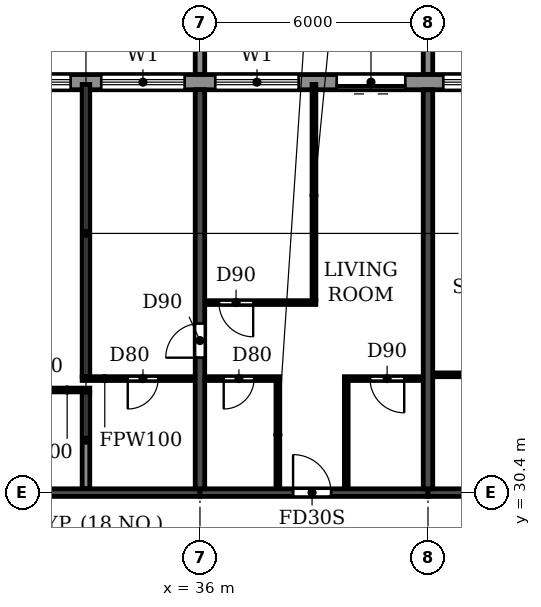
"""IFC4 building model, lengths in metres.
Left out: names, types, materials, properties, quantities, classifications, styles, units other than length and angle.
Written with IfcOpenShell. Run it as: python <this file> out.ifc"""

import sys

from ifc_helpers import new_model, si_unit, direction, frame, frame_2d, origin, place, context, subcontext, project, spatial, polyline, rectangle, outline, extrude, source, transform, mapped, element, fill, save


model = new_model("IFC4")
c1 = context("Model", 3, precision=1e-05, world=origin(), true_north=direction((0.0, 1.0)))
c2 = subcontext(c1, "Body", "Model", "MODEL_VIEW")
j1 = project(units=[si_unit("LENGTHUNIT", "METRE"), si_unit("PLANEANGLEUNIT", "RADIAN")], contexts=[c1])
p1 = place(None, origin())
s1 = spatial("IfcSite", under=j1, at=p1, CompositionType="ELEMENT")
p2 = place(p1, origin())
s2 = spatial("IfcBuilding", under=s1, at=p2, CompositionType="ELEMENT")
p3 = place(p2, frame((0.0, 0.0, 231.3)))
s3 = spatial("IfcBuildingStorey", under=s2, at=p3, CompositionType="ELEMENT", Elevation=231.3)
p4 = place(p3, frame((36.0, 30.5, 0.0), z_axis=(0.0, 0.0, 1.0), x_axis=(0.0, 1.0, 0.0)))
e1 = element("IfcWall", 1, at=p4, inside=s3, PredefinedType="SHEAR", context=c2, shape_type="SweptSolid", body=[
    extrude(rectangle(XDim=10.5, YDim=0.25, at=frame_2d((5.25, 0.0))), origin(), (0.0, 0.0, 1.0), 3.08),
])
p5 = place(p4, frame((3.45, 0.0, 0.0)))
e2 = element("IfcOpeningElement", 2, at=p5, cuts=e1, PredefinedType="OPENING", context=c2, shape_type="SweptSolid", body=[
    extrude(rectangle(XDim=0.9, YDim=2.1, at=frame_2d((0.45, 1.05))), frame((0.0, 0.135, 0.0), z_axis=(0.0, -1.0, 0.0), x_axis=(1.0, 0.0, 0.0)), (0.0, 0.0, 1.0), 0.27),
])
p6 = place(p3, frame((42.0, 30.5, 0.0), z_axis=(0.0, 0.0, 1.0), x_axis=(0.0, 1.0, 0.0)))
e3 = element("IfcWall", 3, at=p6, inside=s3, PredefinedType="SHEAR", context=c2, shape_type="SweptSolid", body=[
    extrude(rectangle(XDim=10.5, YDim=0.25, at=frame_2d((5.25, 0.0))), origin(), (0.0, 0.0, 1.0), 3.08),
])
p7 = place(p3, frame((30.0, 30.4, 0.0), z_axis=(0.0, 0.0, 1.0), x_axis=(1.0, 0.0, 0.0)))
e4 = element("IfcWall", 4, at=p7, inside=s3, PredefinedType="SHEAR", context=c2, shape_type="SweptSolid", body=[
    extrude(rectangle(XDim=6.0, YDim=0.2, at=frame_2d((3.0, 0.0))), origin(), (0.0, 0.0, 1.0), 2.48),
])
p8 = place(p3, frame((36.0, 30.4, 0.0), z_axis=(0.0, 0.0, 1.0), x_axis=(1.0, 0.0, 0.0)))
e5 = element("IfcWall", 5, at=p8, inside=s3, PredefinedType="SHEAR", context=c2, shape_type="SweptSolid", body=[
    extrude(rectangle(XDim=6.0, YDim=0.2, at=frame_2d((3.0, 0.0))), origin(), (0.0, 0.0, 1.0), 2.48),
])
p9 = place(p8, frame((2.45, 0.0, 0.0)))
e6 = element("IfcOpeningElement", 6, at=p9, cuts=e5, PredefinedType="OPENING", context=c2, shape_type="SweptSolid", body=[
    extrude(rectangle(XDim=1.0, YDim=2.1, at=frame_2d((0.5, 1.05))), frame((0.0, 0.11, 0.0), z_axis=(0.0, -1.0, 0.0), x_axis=(1.0, 0.0, 0.0)), (0.0, 0.0, 1.0), 0.22),
])
p10 = place(p3, frame((42.0, 30.4, 0.0), z_axis=(0.0, 0.0, 1.0), x_axis=(1.0, 0.0, 0.0)))
e7 = element("IfcWall", 7, at=p10, inside=s3, PredefinedType="SHEAR", context=c2, shape_type="SweptSolid", body=[
    extrude(rectangle(XDim=6.0, YDim=0.2, at=frame_2d((3.0, 0.0))), origin(), (0.0, 0.0, 1.0), 2.48),
])
p11 = place(p10, frame((2.55, 0.0, 0.0)))
e8 = element("IfcOpeningElement", 8, at=p11, cuts=e7, PredefinedType="OPENING", context=c2, shape_type="SweptSolid", body=[
    extrude(rectangle(XDim=1.0, YDim=2.1, at=frame_2d((0.5, 1.05))), frame((0.0, 0.11, 0.0), z_axis=(0.0, -1.0, 0.0), x_axis=(1.0, 0.0, 0.0)), (0.0, 0.0, 1.0), 0.22),
])
p12 = place(p3, frame((79.317, 41.2, 0.0), z_axis=(0.0, 0.0, 1.0), x_axis=(-1.0, 0.0, 0.0)))
e9 = element("IfcWall", 9, at=p12, inside=s3, PredefinedType="STANDARD", context=c2, shape_type="SweptSolid", body=[
    extrude(rectangle(XDim=56.634, YDim=0.4, at=frame_2d((28.317, 0.0))), origin(), (0.0, 0.0, 1.0), 3.08),
])
p13 = place(p12, frame((52.917, 0.0, 0.0)))
e10 = element("IfcOpeningElement", 10, at=p13, cuts=e9, PredefinedType="OPENING", context=c2, shape_type="SweptSolid", body=[
    extrude(rectangle(XDim=1.8, YDim=2.4, at=frame_2d((0.9, 1.2))), frame((0.0, 0.21, 0.0), z_axis=(0.0, -1.0, 0.0), x_axis=(1.0, 0.0, 0.0)), (0.0, 0.0, 1.0), 0.42),
])
p14 = place(p12, frame((49.717, 0.0, 0.9)))
e11 = element("IfcOpeningElement", 11, at=p14, cuts=e9, PredefinedType="OPENING", context=c2, shape_type="SweptSolid", body=[
    extrude(rectangle(XDim=2.2, YDim=1.5, at=frame_2d((1.1, 0.75))), frame((0.0, 0.21, 0.0), z_axis=(0.0, -1.0, 0.0), x_axis=(1.0, 0.0, 0.0)), (0.0, 0.0, 1.0), 0.42),
])
p15 = place(p12, frame((46.717, 0.0, 0.9)))
e12 = element("IfcOpeningElement", 12, at=p15, cuts=e9, PredefinedType="OPENING", context=c2, shape_type="SweptSolid", body=[
    extrude(rectangle(XDim=2.2, YDim=1.5, at=frame_2d((1.1, 0.75))), frame((0.0, 0.21, 0.0), z_axis=(0.0, -1.0, 0.0), x_axis=(1.0, 0.0, 0.0)), (0.0, 0.0, 1.0), 0.42),
])
p16 = place(p12, frame((43.717, 0.0, 0.9)))
e13 = element("IfcOpeningElement", 13, at=p16, cuts=e9, PredefinedType="OPENING", context=c2, shape_type="SweptSolid", body=[
    extrude(rectangle(XDim=2.2, YDim=1.5, at=frame_2d((1.1, 0.75))), frame((0.0, 0.21, 0.0), z_axis=(0.0, -1.0, 0.0), x_axis=(1.0, 0.0, 0.0)), (0.0, 0.0, 1.0), 0.42),
])
p17 = place(p12, frame((40.717, 0.0, 0.9)))
e14 = element("IfcOpeningElement", 14, at=p17, cuts=e9, PredefinedType="OPENING", context=c2, shape_type="SweptSolid", body=[
    extrude(rectangle(XDim=2.2, YDim=1.5, at=frame_2d((1.1, 0.75))), frame((0.0, 0.21, 0.0), z_axis=(0.0, -1.0, 0.0), x_axis=(1.0, 0.0, 0.0)), (0.0, 0.0, 1.0), 0.42),
])
p18 = place(p12, frame((37.917, 0.0, 0.0)))
e15 = element("IfcOpeningElement", 15, at=p18, cuts=e9, PredefinedType="OPENING", context=c2, shape_type="SweptSolid", body=[
    extrude(rectangle(XDim=1.8, YDim=2.4, at=frame_2d((0.9, 1.2))), frame((0.0, 0.21, 0.0), z_axis=(0.0, -1.0, 0.0), x_axis=(1.0, 0.0, 0.0)), (0.0, 0.0, 1.0), 0.42),
])
p19 = place(p12, frame((34.717, 0.0, 0.9)))
e16 = element("IfcOpeningElement", 16, at=p19, cuts=e9, PredefinedType="OPENING", context=c2, shape_type="SweptSolid", body=[
    extrude(rectangle(XDim=2.2, YDim=1.5, at=frame_2d((1.1, 0.75))), frame((0.0, 0.21, 0.0), z_axis=(0.0, -1.0, 0.0), x_axis=(1.0, 0.0, 0.0)), (0.0, 0.0, 1.0), 0.42),
])
p20 = place(p12, frame((31.917, 0.0, 0.0)))
e17 = element("IfcOpeningElement", 17, at=p20, cuts=e9, PredefinedType="OPENING", context=c2, shape_type="SweptSolid", body=[
    extrude(rectangle(XDim=1.8, YDim=2.4, at=frame_2d((0.9, 1.2))), frame((0.0, 0.21, 0.0), z_axis=(0.0, -1.0, 0.0), x_axis=(1.0, 0.0, 0.0)), (0.0, 0.0, 1.0), 0.42),
])
p21 = place(p12, frame((28.717, 0.0, 0.9)))
e18 = element("IfcOpeningElement", 18, at=p21, cuts=e9, PredefinedType="OPENING", context=c2, shape_type="SweptSolid", body=[
    extrude(rectangle(XDim=2.2, YDim=1.5, at=frame_2d((1.1, 0.75))), frame((0.0, 0.21, 0.0), z_axis=(0.0, -1.0, 0.0), x_axis=(1.0, 0.0, 0.0)), (0.0, 0.0, 1.0), 0.42),
])
p22 = place(p12, frame((25.917, 0.0, 0.0)))
e19 = element("IfcOpeningElement", 19, at=p22, cuts=e9, PredefinedType="OPENING", context=c2, shape_type="SweptSolid", body=[
    extrude(rectangle(XDim=1.8, YDim=2.4, at=frame_2d((0.9, 1.2))), frame((0.0, 0.21, 0.0), z_axis=(0.0, -1.0, 0.0), x_axis=(1.0, 0.0, 0.0)), (0.0, 0.0, 1.0), 0.42),
])
p23 = place(p12, frame((22.717, 0.0, 0.9)))
e20 = element("IfcOpeningElement", 20, at=p23, cuts=e9, PredefinedType="OPENING", context=c2, shape_type="SweptSolid", body=[
    extrude(rectangle(XDim=2.2, YDim=1.5, at=frame_2d((1.1, 0.75))), frame((0.0, 0.21, 0.0), z_axis=(0.0, -1.0, 0.0), x_axis=(1.0, 0.0, 0.0)), (0.0, 0.0, 1.0), 0.42),
])
p24 = place(p12, frame((19.717, 0.0, 0.9)))
e21 = element("IfcOpeningElement", 21, at=p24, cuts=e9, PredefinedType="OPENING", context=c2, shape_type="SweptSolid", body=[
    extrude(rectangle(XDim=2.2, YDim=1.5, at=frame_2d((1.1, 0.75))), frame((0.0, 0.21, 0.0), z_axis=(0.0, -1.0, 0.0), x_axis=(1.0, 0.0, 0.0)), (0.0, 0.0, 1.0), 0.42),
])
p25 = place(p12, frame((16.717, 0.0, 0.9)))
e22 = element("IfcOpeningElement", 22, at=p25, cuts=e9, PredefinedType="OPENING", context=c2, shape_type="SweptSolid", body=[
    extrude(rectangle(XDim=2.2, YDim=1.5, at=frame_2d((1.1, 0.75))), frame((0.0, 0.21, 0.0), z_axis=(0.0, -1.0, 0.0), x_axis=(1.0, 0.0, 0.0)), (0.0, 0.0, 1.0), 0.42),
])
p26 = place(p12, frame((13.917, 0.0, 0.0)))
e23 = element("IfcOpeningElement", 23, at=p26, cuts=e9, PredefinedType="OPENING", context=c2, shape_type="SweptSolid", body=[
    extrude(rectangle(XDim=1.8, YDim=2.4, at=frame_2d((0.9, 1.2))), frame((0.0, 0.21, 0.0), z_axis=(0.0, -1.0, 0.0), x_axis=(1.0, 0.0, 0.0)), (0.0, 0.0, 1.0), 0.42),
])
p27 = place(p12, frame((10.717, 0.0, 0.9)))
e24 = element("IfcOpeningElement", 24, at=p27, cuts=e9, PredefinedType="OPENING", context=c2, shape_type="SweptSolid", body=[
    extrude(rectangle(XDim=2.2, YDim=1.5, at=frame_2d((1.1, 0.75))), frame((0.0, 0.21, 0.0), z_axis=(0.0, -1.0, 0.0), x_axis=(1.0, 0.0, 0.0)), (0.0, 0.0, 1.0), 0.42),
])
p28 = place(p12, frame((7.917, 0.0, 0.0)))
e25 = element("IfcOpeningElement", 25, at=p28, cuts=e9, PredefinedType="OPENING", context=c2, shape_type="SweptSolid", body=[
    extrude(rectangle(XDim=1.8, YDim=2.4, at=frame_2d((0.9, 1.2))), frame((0.0, 0.21, 0.0), z_axis=(0.0, -1.0, 0.0), x_axis=(1.0, 0.0, 0.0)), (0.0, 0.0, 1.0), 0.42),
])
p29 = place(p12, frame((4.717, 0.0, 0.9)))
e26 = element("IfcOpeningElement", 26, at=p29, cuts=e9, PredefinedType="OPENING", context=c2, shape_type="SweptSolid", body=[
    extrude(rectangle(XDim=2.2, YDim=1.5, at=frame_2d((1.1, 0.75))), frame((0.0, 0.21, 0.0), z_axis=(0.0, -1.0, 0.0), x_axis=(1.0, 0.0, 0.0)), (0.0, 0.0, 1.0), 0.42),
])
p30 = place(p12, frame((1.917, 0.0, 0.0)))
e27 = element("IfcOpeningElement", 27, at=p30, cuts=e9, PredefinedType="OPENING", context=c2, shape_type="SweptSolid", body=[
    extrude(rectangle(XDim=1.8, YDim=2.4, at=frame_2d((0.9, 1.2))), frame((0.0, 0.21, 0.0), z_axis=(0.0, -1.0, 0.0), x_axis=(1.0, 0.0, 0.0)), (0.0, 0.0, 1.0), 0.42),
])
m1 = source(origin(), c2, "Body", "SweptSolid", [
    extrude(outline(polyline([(0.0, 0.0), (0.25, 0.0), (0.25, 3.1), (0.0, 3.1), (0.0, 0.0)])), origin(), (0.0, 0.0, 1.0), 3.1),
])
for number, where in (
    (28, (35.875, 41.4, 0.0)),
    (29, (41.875, 41.4, 0.0)),
):
    element("IfcWall", number, at=place(p3, frame(where)), inside=s3, PredefinedType="STANDARD", context=c2, shape_type="MappedRepresentation", body=[
        mapped(m1, transform((0.0, 0.0, 0.0))),
    ])
p31 = place(p3, frame((33.0, 30.51, 0.0), z_axis=(0.0, 0.0, 1.0), x_axis=(0.0, 1.0, 0.0)))
e30 = element("IfcWall", 30, at=p31, inside=s3, PredefinedType="PARTITIONING", context=c2, shape_type="SweptSolid", body=[
    extrude(rectangle(XDim=2.54, YDim=0.2, at=frame_2d((1.27, 0.0))), origin(), (0.0, 0.0, 1.0), 3.08),
])
p32 = place(p3, frame((33.0, 33.45, 0.0), z_axis=(0.0, 0.0, 1.0), x_axis=(0.0, 1.0, 0.0)))
e31 = element("IfcWall", 31, at=p32, inside=s3, PredefinedType="PARTITIONING", context=c2, shape_type="SweptSolid", body=[
    extrude(rectangle(XDim=7.69, YDim=0.2, at=frame_2d((3.845, 0.0))), origin(), (0.0, 0.0, 1.0), 3.08),
])
p33 = place(p3, frame((30.135, 33.1, 0.0), z_axis=(0.0, 0.0, 1.0), x_axis=(1.0, 0.0, 0.0)))
e32 = element("IfcWall", 32, at=p33, inside=s3, PredefinedType="PARTITIONING", context=c2, shape_type="SweptSolid", body=[
    extrude(rectangle(XDim=2.965, YDim=0.1, at=frame_2d((1.482, 0.0))), origin(), (0.0, 0.0, 1.0), 3.08),
])
p34 = place(p33, frame((0.965, 0.0, 0.0)))
e33 = element("IfcOpeningElement", 33, at=p34, cuts=e32, PredefinedType="OPENING", context=c2, shape_type="SweptSolid", body=[
    extrude(rectangle(XDim=0.8, YDim=2.1, at=frame_2d((0.4, 1.05))), frame((0.0, 0.06, 0.0), z_axis=(0.0, -1.0, 0.0), x_axis=(1.0, 0.0, 0.0)), (0.0, 0.0, 1.0), 0.12),
])
p35 = place(p3, frame((32.9, 33.4, 0.0), z_axis=(0.0, 0.0, 1.0), x_axis=(1.0, 0.0, 0.0)))
e34 = element("IfcWall", 34, at=p35, inside=s3, PredefinedType="PARTITIONING", context=c2, shape_type="SweptSolid", body=[
    extrude(rectangle(XDim=2.965, YDim=0.1, at=frame_2d((1.482, 0.0))), origin(), (0.0, 0.0, 1.0), 3.08),
])
p36 = place(p35, frame((1.2, 0.0, 0.0)))
e35 = element("IfcOpeningElement", 35, at=p36, cuts=e34, PredefinedType="OPENING", context=c2, shape_type="SweptSolid", body=[
    extrude(rectangle(XDim=0.8, YDim=2.1, at=frame_2d((0.4, 1.05))), frame((0.0, 0.06, 0.0), z_axis=(0.0, -1.0, 0.0), x_axis=(1.0, 0.0, 0.0)), (0.0, 0.0, 1.0), 0.12),
])
p37 = place(p3, frame((36.135, 33.4, 0.0), z_axis=(0.0, 0.0, 1.0), x_axis=(1.0, 0.0, 0.0)))
e36 = element("IfcWall", 36, at=p37, inside=s3, PredefinedType="PARTITIONING", context=c2, shape_type="SweptSolid", body=[
    extrude(rectangle(XDim=1.965, YDim=0.1, at=frame_2d((0.982, 0.0))), origin(), (0.0, 0.0, 1.0), 3.08),
])
p38 = place(p37, frame((0.49, 0.0, 0.0)))
e37 = element("IfcOpeningElement", 37, at=p38, cuts=e36, PredefinedType="OPENING", context=c2, shape_type="SweptSolid", body=[
    extrude(rectangle(XDim=0.8, YDim=2.1, at=frame_2d((0.4, 1.05))), frame((0.0, 0.06, 0.0), z_axis=(0.0, -1.0, 0.0), x_axis=(1.0, 0.0, 0.0)), (0.0, 0.0, 1.0), 0.12),
])
p39 = place(p3, frame((39.8, 33.4, 0.0), z_axis=(0.0, 0.0, 1.0), x_axis=(1.0, 0.0, 0.0)))
e38 = element("IfcWall", 38, at=p39, inside=s3, PredefinedType="PARTITIONING", context=c2, shape_type="SweptSolid", body=[
    extrude(rectangle(XDim=2.065, YDim=0.1, at=frame_2d((1.032, 0.0))), origin(), (0.0, 0.0, 1.0), 3.08),
])
p40 = place(p39, frame((0.675, 0.0, 0.0)))
e39 = element("IfcOpeningElement", 39, at=p40, cuts=e38, PredefinedType="OPENING", context=c2, shape_type="SweptSolid", body=[
    extrude(rectangle(XDim=0.9, YDim=2.1, at=frame_2d((0.45, 1.05))), frame((0.0, 0.06, 0.0), z_axis=(0.0, -1.0, 0.0), x_axis=(1.0, 0.0, 0.0)), (0.0, 0.0, 1.0), 0.12),
])
p41 = place(p3, frame((42.135, 33.5, 0.0), z_axis=(0.0, 0.0, 1.0), x_axis=(1.0, 0.0, 0.0)))
e40 = element("IfcWall", 40, at=p41, inside=s3, PredefinedType="PARTITIONING", context=c2, shape_type="SweptSolid", body=[
    extrude(rectangle(XDim=2.065, YDim=0.1, at=frame_2d((1.032, 0.0))), origin(), (0.0, 0.0, 1.0), 3.08),
])
p42 = place(p3, frame((36.135, 35.4, 0.0), z_axis=(0.0, 0.0, 1.0), x_axis=(1.0, 0.0, 0.0)))
e41 = element("IfcWall", 41, at=p42, inside=s3, PredefinedType="PARTITIONING", context=c2, shape_type="SweptSolid", body=[
    extrude(rectangle(XDim=2.915, YDim=0.1, at=frame_2d((1.458, 0.0))), origin(), (0.0, 0.0, 1.0), 3.08),
])
p43 = place(p42, frame((0.365, 0.0, 0.0)))
e42 = element("IfcOpeningElement", 42, at=p43, cuts=e41, PredefinedType="OPENING", context=c2, shape_type="SweptSolid", body=[
    extrude(rectangle(XDim=0.9, YDim=2.1, at=frame_2d((0.45, 1.05))), frame((0.0, 0.06, 0.0), z_axis=(0.0, -1.0, 0.0), x_axis=(1.0, 0.0, 0.0)), (0.0, 0.0, 1.0), 0.12),
])
p44 = place(p3, frame((38.05, 30.51, 0.0), z_axis=(0.0, 0.0, 1.0), x_axis=(0.0, 1.0, 0.0)))
e43 = element("IfcWall", 43, at=p44, inside=s3, PredefinedType="PARTITIONING", context=c2, shape_type="SweptSolid", body=[
    extrude(rectangle(XDim=2.84, YDim=0.1, at=frame_2d((1.42, 0.0))), origin(), (0.0, 0.0, 1.0), 3.08),
])
p45 = place(p3, frame((39.0, 35.45, 0.0), z_axis=(0.0, 0.0, 1.0), x_axis=(0.0, 1.0, 0.0)))
e44 = element("IfcWall", 44, at=p45, inside=s3, PredefinedType="PARTITIONING", context=c2, shape_type="SweptSolid", body=[
    extrude(rectangle(XDim=5.69, YDim=0.1, at=frame_2d((2.845, 0.0))), origin(), (0.0, 0.0, 1.0), 3.08),
])
p46 = place(p3, frame((39.85, 30.51, 0.0), z_axis=(0.0, 0.0, 1.0), x_axis=(0.0, 1.0, 0.0)))
e45 = element("IfcWall", 45, at=p46, inside=s3, PredefinedType="PARTITIONING", context=c2, shape_type="SweptSolid", body=[
    extrude(rectangle(XDim=2.84, YDim=0.1, at=frame_2d((1.42, 0.0))), origin(), (0.0, 0.0, 1.0), 3.08),
])
p47 = place(p15, origin())
e46 = element("IfcWindow", 46, at=p47, inside=s3, PartitioningType="DOUBLE_PANEL_HORIZONTAL", PredefinedType="WINDOW", context=c2, shape_type="SweptSolid", body=[
    extrude(rectangle(XDim=2.2, YDim=1.5, at=frame_2d((1.1, 0.75))), frame((0.0, 0.03, 0.0), z_axis=(0.0, -1.0, 0.0), x_axis=(1.0, 0.0, 0.0)), (0.0, 0.0, 1.0), 0.06),
])
fill(e12, e46)
p48 = place(p16, origin())
e47 = element("IfcWindow", 47, at=p48, inside=s3, PartitioningType="DOUBLE_PANEL_HORIZONTAL", PredefinedType="WINDOW", context=c2, shape_type="SweptSolid", body=[
    extrude(rectangle(XDim=2.2, YDim=1.5, at=frame_2d((1.1, 0.75))), frame((0.0, 0.03, 0.0), z_axis=(0.0, -1.0, 0.0), x_axis=(1.0, 0.0, 0.0)), (0.0, 0.0, 1.0), 0.06),
])
fill(e13, e47)
p49 = place(p17, origin())
e48 = element("IfcWindow", 48, at=p49, inside=s3, PartitioningType="DOUBLE_PANEL_HORIZONTAL", PredefinedType="WINDOW", context=c2, shape_type="SweptSolid", body=[
    extrude(rectangle(XDim=2.2, YDim=1.5, at=frame_2d((1.1, 0.75))), frame((0.0, 0.03, 0.0), z_axis=(0.0, -1.0, 0.0), x_axis=(1.0, 0.0, 0.0)), (0.0, 0.0, 1.0), 0.06),
])
fill(e14, e48)
p50 = place(p18, origin())
e49 = element("IfcDoor", 49, at=p50, inside=s3, OperationType="DOUBLE_DOOR_SLIDING", PredefinedType="DOOR", context=c2, shape_type="SweptSolid", body=[
    extrude(rectangle(XDim=1.8, YDim=2.4, at=frame_2d((0.9, 1.2))), frame((0.0, 0.025, 0.0), z_axis=(0.0, -1.0, 0.0), x_axis=(1.0, 0.0, 0.0)), (0.0, 0.0, 1.0), 0.05),
])
fill(e15, e49)
p51 = place(p19, origin())
e50 = element("IfcWindow", 50, at=p51, inside=s3, PartitioningType="DOUBLE_PANEL_HORIZONTAL", PredefinedType="WINDOW", context=c2, shape_type="SweptSolid", body=[
    extrude(rectangle(XDim=2.2, YDim=1.5, at=frame_2d((1.1, 0.75))), frame((0.0, 0.03, 0.0), z_axis=(0.0, -1.0, 0.0), x_axis=(1.0, 0.0, 0.0)), (0.0, 0.0, 1.0), 0.06),
])
fill(e16, e50)
p52 = place(p36, frame((0.8, 0.0, 0.0), z_axis=(0.0, 0.0, 1.0), x_axis=(-1.0, 0.0, 0.0)))
e51 = element("IfcDoor", 51, at=p52, inside=s3, OperationType="SINGLE_SWING_RIGHT", PredefinedType="DOOR", context=c2, shape_type="SweptSolid", body=[
    extrude(rectangle(XDim=0.8, YDim=2.1, at=frame_2d((0.4, 1.05))), frame((0.0, 0.025, 0.0), z_axis=(0.0, -1.0, 0.0), x_axis=(1.0, 0.0, 0.0)), (0.0, 0.0, 1.0), 0.05),
])
fill(e35, e51)
p53 = place(p5, origin())
e52 = element("IfcDoor", 52, at=p53, inside=s3, OperationType="SINGLE_SWING_LEFT", PredefinedType="DOOR", context=c2, shape_type="SweptSolid", body=[
    extrude(rectangle(XDim=0.9, YDim=2.1, at=frame_2d((0.45, 1.05))), frame((0.0, 0.025, 0.0), z_axis=(0.0, -1.0, 0.0), x_axis=(1.0, 0.0, 0.0)), (0.0, 0.0, 1.0), 0.05),
])
fill(e2, e52)
p54 = place(p43, frame((0.9, 0.0, 0.0), z_axis=(0.0, 0.0, 1.0), x_axis=(-1.0, 0.0, 0.0)))
e53 = element("IfcDoor", 53, at=p54, inside=s3, OperationType="SINGLE_SWING_LEFT", PredefinedType="DOOR", context=c2, shape_type="SweptSolid", body=[
    extrude(rectangle(XDim=0.9, YDim=2.1, at=frame_2d((0.45, 1.05))), frame((0.0, 0.025, 0.0), z_axis=(0.0, -1.0, 0.0), x_axis=(1.0, 0.0, 0.0)), (0.0, 0.0, 1.0), 0.05),
])
fill(e42, e53)
p55 = place(p38, frame((0.8, 0.0, 0.0), z_axis=(0.0, 0.0, 1.0), x_axis=(-1.0, 0.0, 0.0)))
e54 = element("IfcDoor", 54, at=p55, inside=s3, OperationType="SINGLE_SWING_RIGHT", PredefinedType="DOOR", context=c2, shape_type="SweptSolid", body=[
    extrude(rectangle(XDim=0.8, YDim=2.1, at=frame_2d((0.4, 1.05))), frame((0.0, 0.025, 0.0), z_axis=(0.0, -1.0, 0.0), x_axis=(1.0, 0.0, 0.0)), (0.0, 0.0, 1.0), 0.05),
])
fill(e37, e54)
p56 = place(p9, origin())
e55 = element("IfcDoor", 55, at=p56, inside=s3, OperationType="SINGLE_SWING_LEFT", PredefinedType="DOOR", context=c2, shape_type="SweptSolid", body=[
    extrude(rectangle(XDim=1.0, YDim=2.1, at=frame_2d((0.5, 1.05))), frame((0.0, 0.025, 0.0), z_axis=(0.0, -1.0, 0.0), x_axis=(1.0, 0.0, 0.0)), (0.0, 0.0, 1.0), 0.05),
])
fill(e6, e55)
p57 = place(p40, frame((0.9, 0.0, 0.0), z_axis=(0.0, 0.0, 1.0), x_axis=(-1.0, 0.0, 0.0)))
e56 = element("IfcDoor", 56, at=p57, inside=s3, OperationType="SINGLE_SWING_LEFT", PredefinedType="DOOR", context=c2, shape_type="SweptSolid", body=[
    extrude(rectangle(XDim=0.9, YDim=2.1, at=frame_2d((0.45, 1.05))), frame((0.0, 0.025, 0.0), z_axis=(0.0, -1.0, 0.0), x_axis=(1.0, 0.0, 0.0)), (0.0, 0.0, 1.0), 0.05),
])
fill(e39, e56)
save(model, sys.argv[1])
